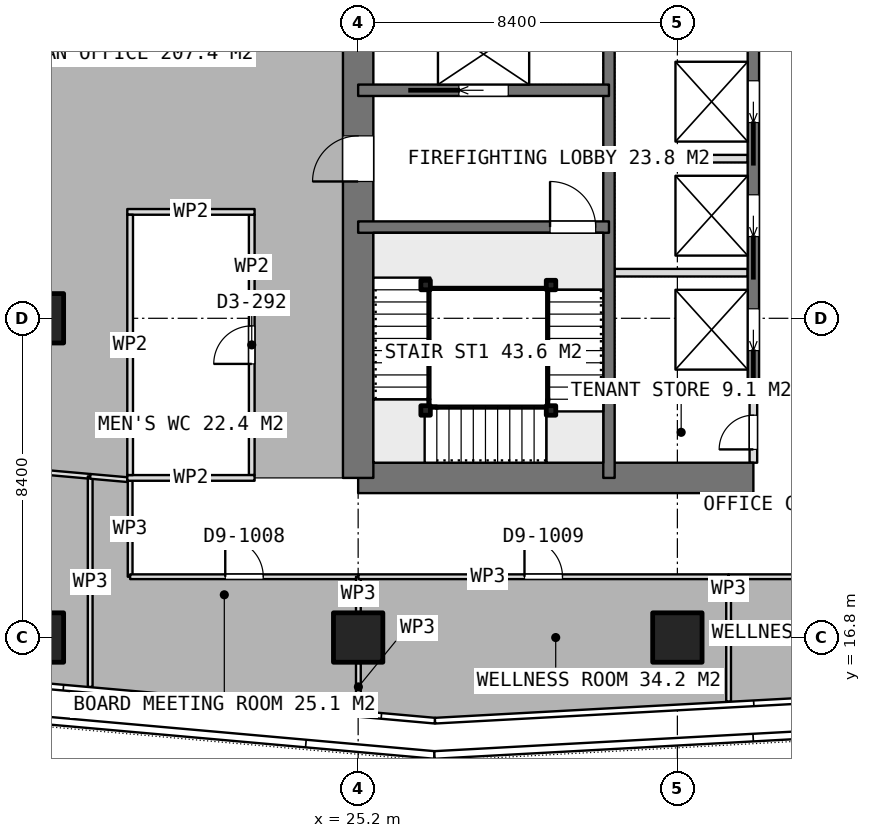
"""IFC4 building model, lengths in metres.
Left out: names, types, materials, properties, quantities, classifications, styles, units other than length and angle.
Written with IfcOpenShell. Run it as: python <this file> out.ifc"""

import sys

from ifc_helpers import new_model, si_unit, direction, frame, frame_2d, origin, origin_2d, place, context, subcontext, project, spatial, rectangle, extrude, element, fill, save


model = new_model("IFC4")
c1 = context("Model", 3, precision=1e-05, world=origin(), true_north=direction((0.0, 1.0)))
c2 = subcontext(c1, "Body", "Model", "MODEL_VIEW")
j1 = project(units=[si_unit("LENGTHUNIT", "METRE"), si_unit("PLANEANGLEUNIT", "RADIAN")], contexts=[c1])
p1 = place(None, origin())
s1 = spatial("IfcSite", under=j1, at=p1, CompositionType="ELEMENT")
p2 = place(p1, origin())
s2 = spatial("IfcBuilding", under=s1, at=p2, CompositionType="ELEMENT")
p3 = place(p2, frame((0.0, 0.0, 272.6)))
s3 = spatial("IfcBuildingStorey", under=s2, at=p3, CompositionType="ELEMENT", Elevation=272.6)
p4 = place(p3, frame((25.2, 21.0, 0.0), z_axis=(0.0, 0.0, 1.0), x_axis=(1.0, 0.0, 0.0)))
e1 = element("IfcWall", 1, at=p4, inside=s3, PredefinedType="SHEAR", context=c2, shape_type="SweptSolid", body=[
    extrude(rectangle(XDim=10.4, YDim=0.8, at=frame_2d((5.2, 0.0))), origin(), (0.0, 0.0, 1.0), 3.75),
])
p5 = place(p3, frame((25.2, 21.0, 0.0), z_axis=(0.0, 0.0, 1.0), x_axis=(0.0, 1.0, 0.0)))
e2 = element("IfcWall", 2, at=p5, inside=s3, PredefinedType="SHEAR", context=c2, shape_type="SweptSolid", body=[
    extrude(rectangle(XDim=25.2, YDim=0.8, at=frame_2d((12.6, 0.0))), origin(), (0.0, 0.0, 1.0), 3.75),
])
p6 = place(p5, frame((7.8, 0.0, 0.0)))
e3 = element("IfcOpeningElement", 3, at=p6, cuts=e2, PredefinedType="OPENING", context=c2, shape_type="SweptSolid", body=[
    extrude(rectangle(XDim=1.2, YDim=2.1, at=frame_2d((0.6, 1.05))), frame((0.0, 0.41, 0.0), z_axis=(0.0, -1.0, 0.0), x_axis=(1.0, 0.0, 0.0)), (0.0, 0.0, 1.0), 0.82),
])
p7 = place(p5, frame((14.25, 0.0, 0.0)))
e4 = element("IfcOpeningElement", 4, at=p7, cuts=e2, PredefinedType="OPENING", context=c2, shape_type="SweptSolid", body=[
    extrude(rectangle(XDim=0.9, YDim=2.1, at=frame_2d((0.45, 1.05))), frame((0.0, 0.41, 0.0), z_axis=(0.0, -1.0, 0.0), x_axis=(1.0, 0.0, 0.0)), (0.0, 0.0, 1.0), 0.82),
])
p8 = place(p5, frame((16.85, 0.0, 0.0)))
e5 = element("IfcOpeningElement", 5, at=p8, cuts=e2, PredefinedType="OPENING", context=c2, shape_type="SweptSolid", body=[
    extrude(rectangle(XDim=0.9, YDim=2.1, at=frame_2d((0.45, 1.05))), frame((0.0, 0.41, 0.0), z_axis=(0.0, -1.0, 0.0), x_axis=(1.0, 0.0, 0.0)), (0.0, 0.0, 1.0), 0.82),
])
p9 = place(p5, frame((18.95, 0.0, 0.0)))
e6 = element("IfcOpeningElement", 6, at=p9, cuts=e2, PredefinedType="OPENING", context=c2, shape_type="SweptSolid", body=[
    extrude(rectangle(XDim=1.2, YDim=2.1, at=frame_2d((0.6, 1.05))), frame((0.0, 0.41, 0.0), z_axis=(0.0, -1.0, 0.0), x_axis=(1.0, 0.0, 0.0)), (0.0, 0.0, 1.0), 0.82),
])
p10 = place(p3, frame((31.8, 21.0, 0.0), z_axis=(0.0, 0.0, 1.0), x_axis=(0.0, 1.0, 0.0)))
e7 = element("IfcWall", 7, at=p10, inside=s3, PredefinedType="SHEAR", context=c2, shape_type="SweptSolid", body=[
    extrude(rectangle(XDim=25.2, YDim=0.3, at=frame_2d((12.6, 0.0))), origin(), (0.0, 0.0, 1.0), 3.75),
])
p11 = place(p3, frame((35.6, 23.4, 0.0), z_axis=(0.0, 0.0, 1.0), x_axis=(0.0, 1.0, 0.0)))
e8 = element("IfcWall", 8, at=p11, inside=s3, PredefinedType="SHEAR", context=c2, shape_type="SweptSolid", body=[
    extrude(rectangle(XDim=18.0, YDim=0.3, at=frame_2d((9.0, 0.0))), origin(), (0.0, 0.0, 1.0), 3.75),
])
p12 = place(p11, frame((0.95, 0.0, 0.0)))
e9 = element("IfcOpeningElement", 9, at=p12, cuts=e8, PredefinedType="OPENING", context=c2, shape_type="SweptSolid", body=[
    extrude(rectangle(XDim=1.1, YDim=2.1, at=frame_2d((0.55, 1.05))), frame((0.0, 0.16, 0.0), z_axis=(0.0, -1.0, 0.0), x_axis=(1.0, 0.0, 0.0)), (0.0, 0.0, 1.0), 0.32),
])
p13 = place(p11, frame((3.95, 0.0, 0.0)))
e10 = element("IfcOpeningElement", 10, at=p13, cuts=e8, PredefinedType="OPENING", context=c2, shape_type="SweptSolid", body=[
    extrude(rectangle(XDim=1.1, YDim=2.1, at=frame_2d((0.55, 1.05))), frame((0.0, 0.16, 0.0), z_axis=(0.0, -1.0, 0.0), x_axis=(1.0, 0.0, 0.0)), (0.0, 0.0, 1.0), 0.32),
])
p14 = place(p11, frame((6.95, 0.0, 0.0)))
e11 = element("IfcOpeningElement", 11, at=p14, cuts=e8, PredefinedType="OPENING", context=c2, shape_type="SweptSolid", body=[
    extrude(rectangle(XDim=1.1, YDim=2.1, at=frame_2d((0.55, 1.05))), frame((0.0, 0.16, 0.0), z_axis=(0.0, -1.0, 0.0), x_axis=(1.0, 0.0, 0.0)), (0.0, 0.0, 1.0), 0.32),
])
p15 = place(p11, frame((9.95, 0.0, 0.0)))
e12 = element("IfcOpeningElement", 12, at=p15, cuts=e8, PredefinedType="OPENING", context=c2, shape_type="SweptSolid", body=[
    extrude(rectangle(XDim=1.1, YDim=2.1, at=frame_2d((0.55, 1.05))), frame((0.0, 0.16, 0.0), z_axis=(0.0, -1.0, 0.0), x_axis=(1.0, 0.0, 0.0)), (0.0, 0.0, 1.0), 0.32),
])
p16 = place(p11, frame((12.95, 0.0, 0.0)))
e13 = element("IfcOpeningElement", 13, at=p16, cuts=e8, PredefinedType="OPENING", context=c2, shape_type="SweptSolid", body=[
    extrude(rectangle(XDim=1.1, YDim=2.1, at=frame_2d((0.55, 1.05))), frame((0.0, 0.16, 0.0), z_axis=(0.0, -1.0, 0.0), x_axis=(1.0, 0.0, 0.0)), (0.0, 0.0, 1.0), 0.32),
])
p17 = place(p11, frame((15.95, 0.0, 0.0)))
e14 = element("IfcOpeningElement", 14, at=p17, cuts=e8, PredefinedType="OPENING", context=c2, shape_type="SweptSolid", body=[
    extrude(rectangle(XDim=1.1, YDim=2.1, at=frame_2d((0.55, 1.05))), frame((0.0, 0.16, 0.0), z_axis=(0.0, -1.0, 0.0), x_axis=(1.0, 0.0, 0.0)), (0.0, 0.0, 1.0), 0.32),
])
p18 = place(p3, frame((31.8, 23.4, 0.0), z_axis=(0.0, 0.0, 1.0), x_axis=(1.0, 0.0, 0.0)))
e15 = element("IfcWall", 15, at=p18, inside=s3, PredefinedType="SHEAR", context=c2, shape_type="SweptSolid", body=[
    extrude(rectangle(XDim=3.8, YDim=0.3, at=frame_2d((1.9, 0.0))), origin(), (0.0, 0.0, 1.0), 3.75),
])
p19 = place(p3, frame((25.2, 27.6, 0.0), z_axis=(0.0, 0.0, 1.0), x_axis=(1.0, 0.0, 0.0)))
e16 = element("IfcWall", 16, at=p19, inside=s3, PredefinedType="SHEAR", context=c2, shape_type="SweptSolid", body=[
    extrude(rectangle(XDim=6.6, YDim=0.3, at=frame_2d((3.3, 0.0))), origin(), (0.0, 0.0, 1.0), 3.75),
])
p20 = place(p19, frame((5.05, 0.0, 0.0)))
e17 = element("IfcOpeningElement", 17, at=p20, cuts=e16, PredefinedType="OPENING", context=c2, shape_type="SweptSolid", body=[
    extrude(rectangle(XDim=1.2, YDim=2.1, at=frame_2d((0.6, 1.05))), frame((0.0, 0.16, 0.0), z_axis=(0.0, -1.0, 0.0), x_axis=(1.0, 0.0, 0.0)), (0.0, 0.0, 1.0), 0.32),
])
p21 = place(p3, frame((25.2, 31.2, 0.0), z_axis=(0.0, 0.0, 1.0), x_axis=(1.0, 0.0, 0.0)))
e18 = element("IfcWall", 18, at=p21, inside=s3, PredefinedType="SHEAR", context=c2, shape_type="SweptSolid", body=[
    extrude(rectangle(XDim=6.6, YDim=0.3, at=frame_2d((3.3, 0.0))), origin(), (0.0, 0.0, 1.0), 3.75),
])
p22 = place(p21, frame((2.65, 0.0, 0.0)))
e19 = element("IfcOpeningElement", 19, at=p22, cuts=e18, PredefinedType="OPENING", context=c2, shape_type="SweptSolid", body=[
    extrude(rectangle(XDim=1.3, YDim=2.1, at=frame_2d((0.65, 1.05))), frame((0.0, 0.16, 0.0), z_axis=(0.0, -1.0, 0.0), x_axis=(1.0, 0.0, 0.0)), (0.0, 0.0, 1.0), 0.32),
])
for number, where, z_axis, x_axis in (
    (20, (16.8, 16.8, 0.0), (0.0, 0.0, 1.0), (1.0, 0.0, 0.0)),
    (21, (16.8, 25.2, 0.0), (0.0, 0.0, 1.0), (1.0, 0.0, 0.0)),
    (22, (25.2, 16.8, 0.0), (0.0, 0.0, 1.0), (1.0, 0.0, 0.0)),
    (23, (33.6, 16.8, 0.0), (0.0, 0.0, 1.0), (1.0, 0.0, 0.0)),
):
    element("IfcColumn", number, at=place(p3, frame(where, z_axis=z_axis, x_axis=x_axis)), inside=s3, PredefinedType="COLUMN", context=c2, shape_type="SweptSolid", body=[
        extrude(rectangle(XDim=1.3, YDim=1.3, at=origin_2d()), origin(), (0.0, 0.0, 1.0), 3.75),
    ])
for number, where, z_axis, x_axis in (
    (24, (31.95, 26.4, 0.0), (0.0, 0.0, 1.0), (1.0, 0.0, 0.0)),
    (25, (31.95, 29.4, 0.0), (0.0, 0.0, 1.0), (1.0, 0.0, 0.0)),
):
    element("IfcWall", number, at=place(p3, frame(where, z_axis=z_axis, x_axis=x_axis)), inside=s3, PredefinedType="PARTITIONING", context=c2, shape_type="SweptSolid", body=[
        extrude(rectangle(XDim=3.5, YDim=0.2, at=frame_2d((1.75, 0.0))), origin(), (0.0, 0.0, 1.0), 3.5),
    ])
p23 = place(p3, frame((35.6, 21.4, 0.0), z_axis=(0.0, 0.0, 1.0), x_axis=(0.0, 1.0, 0.0)))
e26 = element("IfcWall", 26, at=p23, inside=s3, PredefinedType="PARTITIONING", context=c2, shape_type="SweptSolid", body=[
    extrude(rectangle(XDim=1.85, YDim=0.2, at=frame_2d((0.925, 0.0))), origin(), (0.0, 0.0, 1.0), 3.5),
])
p24 = place(p23, frame((0.35, 0.0, 0.0)))
e27 = element("IfcOpeningElement", 27, at=p24, cuts=e26, PredefinedType="OPENING", context=c2, shape_type="SweptSolid", body=[
    extrude(rectangle(XDim=0.9, YDim=2.1, at=frame_2d((0.45, 1.05))), frame((0.0, 0.11, 0.0), z_axis=(0.0, -1.0, 0.0), x_axis=(1.0, 0.0, 0.0)), (0.0, 0.0, 1.0), 0.22),
])
for number, where, z_axis, x_axis in (
    (28, (19.125, 21.0, 0.0), (0.0, 0.0, 1.0), (1.0, 0.0, 0.0)),
    (29, (19.125, 28.0, 0.0), (0.0, 0.0, 1.0), (1.0, 0.0, 0.0)),
):
    element("IfcWall", number, at=place(p3, frame(where, z_axis=z_axis, x_axis=x_axis)), inside=s3, PredefinedType="PARTITIONING", context=c2, shape_type="SweptSolid", body=[
        extrude(rectangle(XDim=3.35, YDim=0.15, at=frame_2d((1.675, 0.0))), origin(), (0.0, 0.0, 1.0), 3.5),
    ])
p25 = place(p3, frame((19.2, 21.075, 0.0), z_axis=(0.0, 0.0, 1.0), x_axis=(0.0, 1.0, 0.0)))
e30 = element("IfcWall", 30, at=p25, inside=s3, PredefinedType="PARTITIONING", context=c2, shape_type="SweptSolid", body=[
    extrude(rectangle(XDim=6.85, YDim=0.15, at=frame_2d((3.425, 0.0))), origin(), (0.0, 0.0, 1.0), 3.5),
])
p26 = place(p3, frame((22.4, 21.075, 0.0), z_axis=(0.0, 0.0, 1.0), x_axis=(0.0, 1.0, 0.0)))
e31 = element("IfcWall", 31, at=p26, inside=s3, PredefinedType="PARTITIONING", context=c2, shape_type="SweptSolid", body=[
    extrude(rectangle(XDim=6.85, YDim=0.15, at=frame_2d((3.425, 0.0))), origin(), (0.0, 0.0, 1.0), 3.5),
])
p27 = place(p26, frame((2.925, 0.0, 0.0)))
e32 = element("IfcOpeningElement", 32, at=p27, cuts=e31, PredefinedType="OPENING", context=c2, shape_type="SweptSolid", body=[
    extrude(rectangle(XDim=1.0, YDim=2.1, at=frame_2d((0.5, 1.05))), frame((0.0, 0.085, 0.0), z_axis=(0.0, -1.0, 0.0), x_axis=(1.0, 0.0, 0.0)), (0.0, 0.0, 1.0), 0.17),
])
p28 = place(p3, frame((34.948, 15.114, 0.0), z_axis=(0.0, 0.0, 1.0), x_axis=(0.0, 1.0, 0.0)))
e33 = element("IfcWall", 33, at=p28, inside=s3, PredefinedType="PARTITIONING", context=c2, shape_type="SweptSolid", body=[
    extrude(rectangle(XDim=3.286, YDim=0.125, at=frame_2d((1.643, 0.0))), origin(), (0.0, 0.0, 1.0), 3.5),
])
p29 = place(p3, frame((34.948, 18.4, 0.0), z_axis=(0.0, 0.0, 1.0), x_axis=(1.0, 0.0, 0.0)))
e34 = element("IfcWall", 34, at=p29, inside=s3, PredefinedType="PARTITIONING", context=c2, shape_type="SweptSolid", body=[
    extrude(rectangle(XDim=7.725, YDim=0.125, at=frame_2d((3.863, 0.0))), origin(), (0.0, 0.0, 1.0), 3.5),
])
p30 = place(p29, frame((3.363, 0.0, 0.0)))
e35 = element("IfcOpeningElement", 35, at=p30, cuts=e34, PredefinedType="OPENING", context=c2, shape_type="SweptSolid", body=[
    extrude(rectangle(XDim=1.0, YDim=2.1, at=frame_2d((0.5, 1.05))), frame((0.0, 0.073, 0.0), z_axis=(0.0, -1.0, 0.0), x_axis=(1.0, 0.0, 0.0)), (0.0, 0.0, 1.0), 0.145),
])
p31 = place(p3, frame((12.787, 21.518, 0.0), z_axis=(0.0, 0.0, 1.0), x_axis=(0.996065348673, -0.088621787237, 0.0)))
e36 = element("IfcWall", 36, at=p31, inside=s3, PredefinedType="PARTITIONING", context=c2, shape_type="SweptSolid", body=[
    extrude(rectangle(XDim=5.383, YDim=0.125, at=frame_2d((2.691, 0.0))), origin(), (0.0, 0.0, 1.0), 3.5),
])
p32 = place(p3, frame((18.149, 21.041, 0.0), z_axis=(0.0, 0.0, 1.0), x_axis=(0.0, -1.0, 0.0)))
e37 = element("IfcWall", 37, at=p32, inside=s3, PredefinedType="PARTITIONING", context=c2, shape_type="SweptSolid", body=[
    extrude(rectangle(XDim=5.541, YDim=0.125, at=frame_2d((2.771, 0.0))), origin(), (0.0, 0.0, 1.0), 3.5),
])
p33 = place(p3, frame((18.15, 21.041, 0.0), z_axis=(0.0, 0.0, 1.0), x_axis=(0.996138836376, -0.087791905459, 0.0)))
e38 = element("IfcWall", 38, at=p33, inside=s3, PredefinedType="PARTITIONING", context=c2, shape_type="SweptSolid", body=[
    extrude(rectangle(XDim=0.979, YDim=0.125, at=frame_2d((0.489, 0.0))), origin(), (0.0, 0.0, 1.0), 3.5),
])
p34 = place(p3, frame((19.2, 20.925, 0.0), z_axis=(0.0, 0.0, 1.0), x_axis=(0.0, -1.0, 0.0)))
e39 = element("IfcWall", 39, at=p34, inside=s3, PredefinedType="PARTITIONING", context=c2, shape_type="SweptSolid", body=[
    extrude(rectangle(XDim=2.525, YDim=0.125, at=frame_2d((1.263, 0.0))), origin(), (0.0, 0.0, 1.0), 3.5),
])
p35 = place(p3, frame((19.2, 18.4, 0.0), z_axis=(0.0, 0.0, 1.0), x_axis=(1.0, 0.0, 0.0)))
e40 = element("IfcWall", 40, at=p35, inside=s3, PredefinedType="PARTITIONING", context=c2, shape_type="SweptSolid", body=[
    extrude(rectangle(XDim=6.006, YDim=0.125, at=frame_2d((3.003, 0.0))), origin(), (0.0, 0.0, 1.0), 3.5),
])
p36 = place(p35, frame((2.503, 0.0, 0.0)))
e41 = element("IfcOpeningElement", 41, at=p36, cuts=e40, PredefinedType="OPENING", context=c2, shape_type="SweptSolid", body=[
    extrude(rectangle(XDim=1.0, YDim=2.1, at=frame_2d((0.5, 1.05))), frame((0.0, 0.073, 0.0), z_axis=(0.0, -1.0, 0.0), x_axis=(1.0, 0.0, 0.0)), (0.0, 0.0, 1.0), 0.145),
])
p37 = place(p3, frame((25.206, 18.4, 0.0), z_axis=(0.0, 0.0, 1.0), x_axis=(0.0, -1.0, 0.0)))
e42 = element("IfcWall", 42, at=p37, inside=s3, PredefinedType="PARTITIONING", context=c2, shape_type="SweptSolid", body=[
    extrude(rectangle(XDim=0.93, YDim=0.125, at=frame_2d((0.465, 0.0))), origin(), (0.0, 0.0, 1.0), 3.5),
])
p38 = place(p3, frame((25.206, 16.13, 0.0), z_axis=(0.0, 0.0, 1.0), x_axis=(0.0, -1.0, 0.0)))
e43 = element("IfcWall", 43, at=p38, inside=s3, PredefinedType="PARTITIONING", context=c2, shape_type="SweptSolid", body=[
    extrude(rectangle(XDim=1.258, YDim=0.125, at=frame_2d((0.629, 0.0))), origin(), (0.0, 0.0, 1.0), 3.5),
])
p39 = place(p3, frame((25.207, 18.4, 0.0), z_axis=(0.0, 0.0, 1.0), x_axis=(1.0, 0.0, 0.0)))
e44 = element("IfcWall", 44, at=p39, inside=s3, PredefinedType="PARTITIONING", context=c2, shape_type="SweptSolid", body=[
    extrude(rectangle(XDim=9.74, YDim=0.125, at=frame_2d((4.87, 0.0))), origin(), (0.0, 0.0, 1.0), 3.5),
])
p40 = place(p39, frame((4.37, 0.0, 0.0)))
e45 = element("IfcOpeningElement", 45, at=p40, cuts=e44, PredefinedType="OPENING", context=c2, shape_type="SweptSolid", body=[
    extrude(rectangle(XDim=1.0, YDim=2.1, at=frame_2d((0.5, 1.05))), frame((0.0, 0.073, 0.0), z_axis=(0.0, -1.0, 0.0), x_axis=(1.0, 0.0, 0.0)), (0.0, 0.0, 1.0), 0.145),
])
for number, where, z_axis, x_axis in (
    (46, (30.275, 26.075, 0.0), (0.0, 0.0, 1.0), (1.0, 0.0, 0.0)),
    (47, (30.275, 22.775, 0.0), (0.0, 0.0, 1.0), (1.0, 0.0, 0.0)),
    (48, (26.975, 22.775, 0.0), (0.0, 0.0, 1.0), (1.0, 0.0, 0.0)),
    (49, (26.975, 26.075, 0.0), (0.0, 0.0, 1.0), (1.0, 0.0, 0.0)),
):
    element("IfcColumn", number, at=place(p3, frame(where, z_axis=z_axis, x_axis=x_axis)), inside=s3, PredefinedType="COLUMN", context=c2, shape_type="SweptSolid", body=[
        extrude(rectangle(XDim=0.25, YDim=0.25, at=origin_2d()), origin(), (0.0, 0.0, 1.0), 3.75),
    ])
p41 = place(p6, origin())
e50 = element("IfcDoor", 50, at=p41, inside=s3, OperationType="SINGLE_SWING_LEFT", PredefinedType="DOOR", context=c2, shape_type="SweptSolid", body=[
    extrude(rectangle(XDim=1.2, YDim=2.1, at=frame_2d((0.6, 1.05))), frame((0.0, 0.025, 0.0), z_axis=(0.0, -1.0, 0.0), x_axis=(1.0, 0.0, 0.0)), (0.0, 0.0, 1.0), 0.05),
])
fill(e3, e50)
p42 = place(p24, origin())
e51 = element("IfcDoor", 51, at=p42, inside=s3, OperationType="SINGLE_SWING_LEFT", PredefinedType="DOOR", context=c2, shape_type="SweptSolid", body=[
    extrude(rectangle(XDim=0.9, YDim=2.1, at=frame_2d((0.45, 1.05))), frame((0.0, 0.025, 0.0), z_axis=(0.0, -1.0, 0.0), x_axis=(1.0, 0.0, 0.0)), (0.0, 0.0, 1.0), 0.05),
])
fill(e27, e51)
p43 = place(p12, origin())
e52 = element("IfcDoor", 52, at=p43, inside=s3, OperationType="SLIDING_TO_LEFT", PredefinedType="USERDEFINED", context=c2, shape_type="SweptSolid", body=[
    extrude(rectangle(XDim=1.1, YDim=2.1, at=frame_2d((0.55, 1.05))), frame((0.0, 0.025, 0.0), z_axis=(0.0, -1.0, 0.0), x_axis=(1.0, 0.0, 0.0)), (0.0, 0.0, 1.0), 0.05),
])
fill(e9, e52)
p44 = place(p13, origin())
e53 = element("IfcDoor", 53, at=p44, inside=s3, OperationType="SLIDING_TO_LEFT", PredefinedType="USERDEFINED", context=c2, shape_type="SweptSolid", body=[
    extrude(rectangle(XDim=1.1, YDim=2.1, at=frame_2d((0.55, 1.05))), frame((0.0, 0.025, 0.0), z_axis=(0.0, -1.0, 0.0), x_axis=(1.0, 0.0, 0.0)), (0.0, 0.0, 1.0), 0.05),
])
fill(e10, e53)
p45 = place(p14, origin())
e54 = element("IfcDoor", 54, at=p45, inside=s3, OperationType="SLIDING_TO_LEFT", PredefinedType="USERDEFINED", context=c2, shape_type="SweptSolid", body=[
    extrude(rectangle(XDim=1.1, YDim=2.1, at=frame_2d((0.55, 1.05))), frame((0.0, 0.025, 0.0), z_axis=(0.0, -1.0, 0.0), x_axis=(1.0, 0.0, 0.0)), (0.0, 0.0, 1.0), 0.05),
])
fill(e11, e54)
p46 = place(p22, origin())
e55 = element("IfcDoor", 55, at=p46, inside=s3, OperationType="SLIDING_TO_LEFT", PredefinedType="USERDEFINED", context=c2, shape_type="SweptSolid", body=[
    extrude(rectangle(XDim=1.3, YDim=2.1, at=frame_2d((0.65, 1.05))), frame((0.0, 0.025, 0.0), z_axis=(0.0, -1.0, 0.0), x_axis=(1.0, 0.0, 0.0)), (0.0, 0.0, 1.0), 0.05),
])
fill(e19, e55)
p47 = place(p27, origin())
e56 = element("IfcDoor", 56, at=p47, inside=s3, OperationType="SINGLE_SWING_LEFT", PredefinedType="DOOR", context=c2, shape_type="SweptSolid", body=[
    extrude(rectangle(XDim=1.0, YDim=2.1, at=frame_2d((0.5, 1.05))), frame((0.0, 0.025, 0.0), z_axis=(0.0, -1.0, 0.0), x_axis=(1.0, 0.0, 0.0)), (0.0, 0.0, 1.0), 0.05),
])
fill(e32, e56)
p48 = place(p36, origin())
e57 = element("IfcDoor", 57, at=p48, inside=s3, OperationType="SINGLE_SWING_LEFT", PredefinedType="DOOR", context=c2, shape_type="SweptSolid", body=[
    extrude(rectangle(XDim=1.0, YDim=2.1, at=frame_2d((0.5, 1.05))), frame((0.0, 0.025, 0.0), z_axis=(0.0, -1.0, 0.0), x_axis=(1.0, 0.0, 0.0)), (0.0, 0.0, 1.0), 0.05),
])
fill(e41, e57)
p49 = place(p40, origin())
e58 = element("IfcDoor", 58, at=p49, inside=s3, OperationType="SINGLE_SWING_LEFT", PredefinedType="DOOR", context=c2, shape_type="SweptSolid", body=[
    extrude(rectangle(XDim=1.0, YDim=2.1, at=frame_2d((0.5, 1.05))), frame((0.0, 0.025, 0.0), z_axis=(0.0, -1.0, 0.0), x_axis=(1.0, 0.0, 0.0)), (0.0, 0.0, 1.0), 0.05),
])
fill(e45, e58)
p50 = place(p20, origin())
e59 = element("IfcDoor", 59, at=p50, inside=s3, OperationType="SINGLE_SWING_RIGHT", PredefinedType="DOOR", context=c2, shape_type="SweptSolid", body=[
    extrude(rectangle(XDim=1.2, YDim=2.1, at=frame_2d((0.6, 1.05))), frame((0.0, 0.025, 0.0), z_axis=(0.0, -1.0, 0.0), x_axis=(1.0, 0.0, 0.0)), (0.0, 0.0, 1.0), 0.05),
])
fill(e17, e59)
save(model, sys.argv[1])
